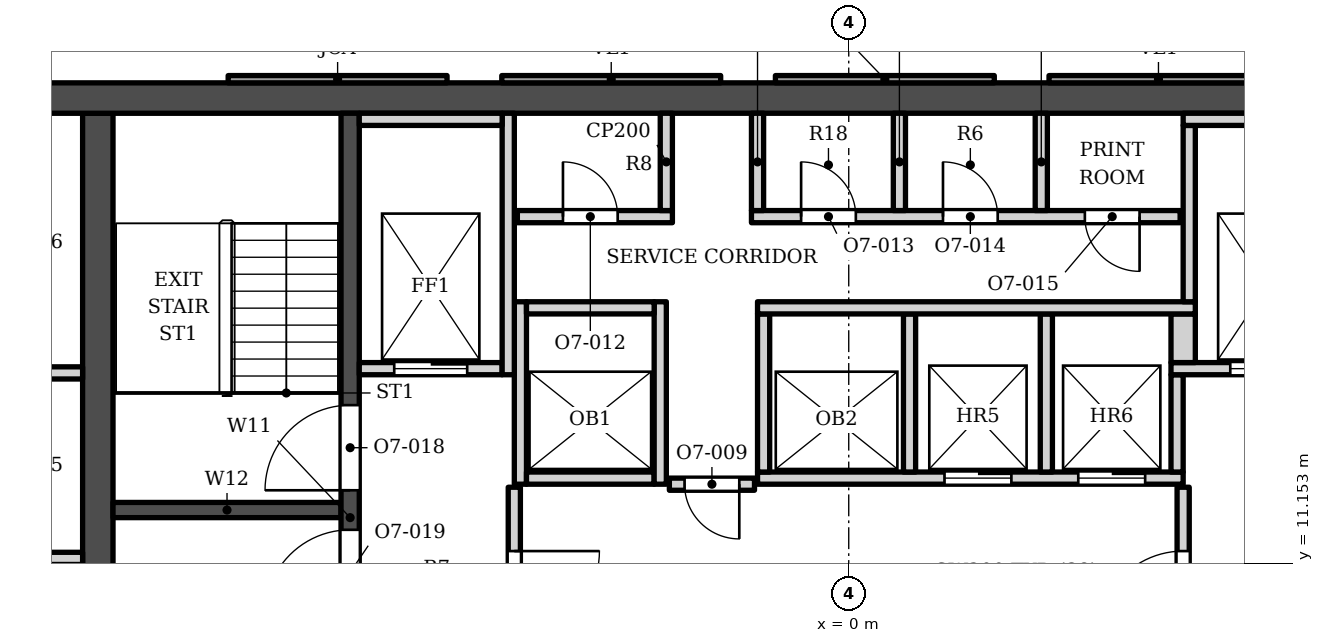
"""IFC4 building model, lengths in metres.
Left out: names, types, materials, properties, quantities, classifications, styles, units other than length and angle.
Written with IfcOpenShell. Run it as: python <this file> out.ifc"""

import sys

from ifc_helpers import new_model, si_unit, direction, frame, frame_2d, origin, place, context, subcontext, project, spatial, polyline, rectangle, outline, extrude, element, fill, save


model = new_model("IFC4")
c1 = context("Model", 3, precision=1e-05, world=origin(), true_north=direction((0.0, 1.0)))
c2 = subcontext(c1, "Body", "Model", "MODEL_VIEW")
j1 = project(units=[si_unit("LENGTHUNIT", "METRE"), si_unit("PLANEANGLEUNIT", "RADIAN")], contexts=[c1])
p1 = place(None, origin())
s1 = spatial("IfcSite", under=j1, at=p1, CompositionType="ELEMENT")
p2 = place(p1, origin())
s2 = spatial("IfcBuilding", under=s1, at=p2, CompositionType="ELEMENT")
p3 = place(p2, frame((0.0, 0.0, 219.8)))
s3 = spatial("IfcBuildingStorey", under=s2, at=p3, CompositionType="ELEMENT", Elevation=219.8)
p4 = place(p3, frame((-13.9, 18.802, 0.0), z_axis=(0.0, 0.0, 1.0), x_axis=(1.0, 0.0, 0.0)))
e1 = element("IfcWall", 1, at=p4, inside=s3, PredefinedType="SHEAR", context=c2, shape_type="SweptSolid", body=[
    extrude(rectangle(XDim=27.8, YDim=0.5, at=frame_2d((13.9, 0.0))), origin(), (0.0, 0.0, 1.0), 3.9),
])
p5 = place(p3, frame((-12.35, 5.253, 0.0), z_axis=(0.0, 0.0, 1.0), x_axis=(0.0, 1.0, 0.0)))
e2 = element("IfcWall", 2, at=p5, inside=s3, PredefinedType="SHEAR", context=c2, shape_type="SweptSolid", body=[
    extrude(rectangle(XDim=13.3, YDim=0.5, at=frame_2d((6.65, 0.0))), origin(), (0.0, 0.0, 1.0), 3.9),
])
p6 = place(p3, frame((-8.2, 5.253, 0.0), z_axis=(0.0, 0.0, 1.0), x_axis=(0.0, 1.0, 0.0)))
e3 = element("IfcWall", 3, at=p6, inside=s3, PredefinedType="SHEAR", context=c2, shape_type="SweptSolid", body=[
    extrude(rectangle(XDim=13.3, YDim=0.3, at=frame_2d((6.65, 0.0))), origin(), (0.0, 0.0, 1.0), 3.9),
])
p7 = place(p6, frame((7.1, 0.0, 0.0)))
e4 = element("IfcOpeningElement", 4, at=p7, cuts=e3, PredefinedType="OPENING", context=c2, shape_type="SweptSolid", body=[
    extrude(rectangle(XDim=1.4, YDim=2.1, at=frame_2d((0.7, 1.05))), frame((0.0, 0.16, 0.0), z_axis=(0.0, -1.0, 0.0), x_axis=(1.0, 0.0, 0.0)), (0.0, 0.0, 1.0), 0.32),
])
p8 = place(p6, frame((5.05, 0.0, 0.0)))
e5 = element("IfcOpeningElement", 5, at=p8, cuts=e3, PredefinedType="OPENING", context=c2, shape_type="SweptSolid", body=[
    extrude(rectangle(XDim=1.4, YDim=2.1, at=frame_2d((0.7, 1.05))), frame((0.0, 0.16, 0.0), z_axis=(0.0, -1.0, 0.0), x_axis=(1.0, 0.0, 0.0)), (0.0, 0.0, 1.0), 0.32),
])
p9 = place(p3, frame((-12.1, 12.028, 0.0), z_axis=(0.0, 0.0, 1.0), x_axis=(1.0, 0.0, 0.0)))
e6 = element("IfcWall", 6, at=p9, inside=s3, PredefinedType="SHEAR", context=c2, shape_type="SweptSolid", body=[
    extrude(rectangle(XDim=3.75, YDim=0.25, at=frame_2d((1.875, 0.0))), origin(), (0.0, 0.0, 1.0), 3.9),
])
p10 = place(p3, origin())
e7 = element("IfcWall", 7, at=p10, inside=s3, PredefinedType="ELEMENTEDWALL", context=c2, shape_type="SweptSolid", body=[
    extrude(outline(polyline([(3.294, 19.173), (3.294, 19.052), (6.894, 19.052), (6.894, 19.173), (3.294, 19.173)])), origin(), (0.0, 0.0, 1.0), 3.0),
])
p11 = place(p3, origin())
e8 = element("IfcWall", 8, at=p11, inside=s3, PredefinedType="SOLIDWALL", context=c2, shape_type="SweptSolid", body=[
    extrude(outline(polyline([(-1.206, 19.173), (-1.206, 19.052), (2.394, 19.052), (2.394, 19.173), (-1.206, 19.173)])), origin(), (0.0, 0.0, 1.0), 3.0),
])
p12 = place(p3, origin())
e9 = element("IfcWall", 9, at=p12, inside=s3, PredefinedType="ELEMENTEDWALL", context=c2, shape_type="SweptSolid", body=[
    extrude(outline(polyline([(-5.706, 19.173), (-5.706, 19.052), (-2.106, 19.052), (-2.106, 19.173), (-5.706, 19.173)])), origin(), (0.0, 0.0, 1.0), 3.0),
])
p13 = place(p3, origin())
e10 = element("IfcWall", 10, at=p13, inside=s3, PredefinedType="SOLIDWALL", context=c2, shape_type="SweptSolid", body=[
    extrude(outline(polyline([(-10.206, 19.173), (-10.206, 19.052), (-6.606, 19.052), (-6.606, 19.173), (-10.206, 19.173)])), origin(), (0.0, 0.0, 1.0), 3.0),
])
p14 = place(p3, frame((-5.5, 9.103, 0.0), z_axis=(0.0, 0.0, 1.0), x_axis=(0.0, 1.0, 0.0)))
e11 = element("IfcWall", 11, at=p14, inside=s3, PredefinedType="SOLIDWALL", context=c2, shape_type="SweptSolid", body=[
    extrude(rectangle(XDim=3.3, YDim=0.2, at=frame_2d((1.65, 0.0))), origin(), (0.0, 0.0, 1.0), 3.73),
])
p15 = place(p14, frame((0.85, 0.0, 0.0)))
e12 = element("IfcOpeningElement", 12, at=p15, cuts=e11, PredefinedType="OPENING", context=c2, shape_type="SweptSolid", body=[
    extrude(rectangle(XDim=1.4, YDim=2.1, at=frame_2d((0.7, 1.05))), frame((0.0, 0.11, 0.0), z_axis=(0.0, -1.0, 0.0), x_axis=(1.0, 0.0, 0.0)), (0.0, 0.0, 1.0), 0.22),
])
p16 = place(p3, frame((5.5, 9.103, 0.0), z_axis=(0.0, 0.0, 1.0), x_axis=(0.0, 1.0, 0.0)))
e13 = element("IfcWall", 13, at=p16, inside=s3, PredefinedType="SOLIDWALL", context=c2, shape_type="SweptSolid", body=[
    extrude(rectangle(XDim=3.3, YDim=0.2, at=frame_2d((1.65, 0.0))), origin(), (0.0, 0.0, 1.0), 3.73),
])
p17 = place(p16, frame((0.85, 0.0, 0.0)))
e14 = element("IfcOpeningElement", 14, at=p17, cuts=e13, PredefinedType="OPENING", context=c2, shape_type="SweptSolid", body=[
    extrude(rectangle(XDim=1.4, YDim=2.1, at=frame_2d((0.7, 1.05))), frame((0.0, 0.11, 0.0), z_axis=(0.0, -1.0, 0.0), x_axis=(1.0, 0.0, 0.0)), (0.0, 0.0, 1.0), 0.22),
])
p18 = place(p3, frame((-13.9, 11.233, 0.0), z_axis=(0.0, 0.0, 1.0), x_axis=(1.0, 0.0, 0.0)))
e15 = element("IfcWall", 15, at=p18, inside=s3, PredefinedType="SOLIDWALL", context=c2, shape_type="SweptSolid", body=[
    extrude(rectangle(XDim=1.3, YDim=0.2, at=frame_2d((0.65, 0.0))), origin(), (0.0, 0.0, 1.0), 3.73),
])
p19 = place(p3, frame((-2.95, 12.453, 0.0), z_axis=(0.0, 0.0, 1.0), x_axis=(1.0, 0.0, 0.0)))
e16 = element("IfcWall", 16, at=p19, inside=s3, PredefinedType="SOLIDWALL", context=c2, shape_type="SweptSolid", body=[
    extrude(rectangle(XDim=1.4, YDim=0.2, at=frame_2d((0.7, 0.0))), origin(), (0.0, 0.0, 1.0), 3.73),
])
p20 = place(p19, frame((0.25, 0.0, 0.0)))
e17 = element("IfcOpeningElement", 17, at=p20, cuts=e16, PredefinedType="OPENING", context=c2, shape_type="SweptSolid", body=[
    extrude(rectangle(XDim=0.9, YDim=2.1, at=frame_2d((0.45, 1.05))), frame((0.0, 0.11, 0.0), z_axis=(0.0, -1.0, 0.0), x_axis=(1.0, 0.0, 0.0)), (0.0, 0.0, 1.0), 0.22),
])
p21 = place(p3, frame((-5.4, 12.453, 0.0), z_axis=(0.0, 0.0, 1.0), x_axis=(0.0, 1.0, 0.0)))
e18 = element("IfcWall", 18, at=p21, inside=s3, PredefinedType="SOLIDWALL", context=c2, shape_type="SweptSolid", body=[
    extrude(rectangle(XDim=3.0, YDim=0.2, at=frame_2d((1.5, 0.0))), origin(), (0.0, 0.0, 1.0), 3.73),
])
p22 = place(p3, frame((-5.3, 12.552, 0.0), z_axis=(0.0, 0.0, 1.0), x_axis=(1.0, 0.0, 0.0)))
e19 = element("IfcWall", 19, at=p22, inside=s3, PredefinedType="SOLIDWALL", context=c2, shape_type="SweptSolid", body=[
    extrude(rectangle(XDim=2.1, YDim=0.2, at=frame_2d((1.05, 0.0))), origin(), (0.0, 0.0, 1.0), 3.73),
])
p23 = place(p3, frame((-3.1, 12.453, 0.0), z_axis=(0.0, 0.0, 1.0), x_axis=(0.0, 1.0, 0.0)))
e20 = element("IfcWall", 20, at=p23, inside=s3, PredefinedType="SOLIDWALL", context=c2, shape_type="SweptSolid", body=[
    extrude(rectangle(XDim=3.0, YDim=0.2, at=frame_2d((1.5, 0.0))), origin(), (0.0, 0.0, 1.0), 3.73),
])
p24 = place(p3, frame((-1.5, 12.552, 0.0), z_axis=(0.0, 0.0, 1.0), x_axis=(1.0, 0.0, 0.0)))
e21 = element("IfcWall", 21, at=p24, inside=s3, PredefinedType="SOLIDWALL", context=c2, shape_type="SweptSolid", body=[
    extrude(rectangle(XDim=7.0, YDim=0.2, at=frame_2d((3.5, 0.0))), origin(), (0.0, 0.0, 1.0), 3.73),
])
p25 = place(p24, frame((3.075, 0.0, 0.0)))
e22 = element("IfcOpeningElement", 22, at=p25, cuts=e21, PredefinedType="OPENING", context=c2, shape_type="SweptSolid", body=[
    extrude(rectangle(XDim=1.1, YDim=2.1, at=frame_2d((0.55, 1.05))), frame((0.0, 0.11, 0.0), z_axis=(0.0, -1.0, 0.0), x_axis=(1.0, 0.0, 0.0)), (0.0, 0.0, 1.0), 0.22),
])
p26 = place(p24, frame((5.275, 0.0, 0.0)))
e23 = element("IfcOpeningElement", 23, at=p26, cuts=e21, PredefinedType="OPENING", context=c2, shape_type="SweptSolid", body=[
    extrude(rectangle(XDim=1.1, YDim=2.1, at=frame_2d((0.55, 1.05))), frame((0.0, 0.11, 0.0), z_axis=(0.0, -1.0, 0.0), x_axis=(1.0, 0.0, 0.0)), (0.0, 0.0, 1.0), 0.22),
])
for number, where, z_axis, x_axis in (
    (24, (-1.4, 12.653, 0.0), (0.0, 0.0, 1.0), (0.0, 1.0, 0.0)),
    (25, (1.0, 12.653, 0.0), (0.0, 0.0, 1.0), (0.0, 1.0, 0.0)),
    (26, (3.25, 12.653, 0.0), (0.0, 0.0, 1.0), (0.0, 1.0, 0.0)),
):
    element("IfcWall", number, at=place(p3, frame(where, z_axis=z_axis, x_axis=x_axis)), inside=s3, PredefinedType="SOLIDWALL", context=c2, shape_type="SweptSolid", body=[
        extrude(rectangle(XDim=2.6, YDim=0.2, at=frame_2d((1.3, 0.0))), origin(), (0.0, 0.0, 1.0), 3.73),
    ])
p27 = place(p3, frame((5.4, 12.653, 0.0), z_axis=(0.0, 0.0, 1.0), x_axis=(0.0, 1.0, 0.0)))
e27 = element("IfcWall", 27, at=p27, inside=s3, PredefinedType="SOLIDWALL", context=c2, shape_type="SweptSolid", body=[
    extrude(rectangle(XDim=1.6, YDim=0.2, at=frame_2d((0.8, 0.0))), origin(), (0.0, 0.0, 1.0), 3.73),
])
p28 = place(p3, frame((-13.9, 14.283, 0.0), z_axis=(0.0, 0.0, 1.0), x_axis=(1.0, 0.0, 0.0)))
e28 = element("IfcWall", 28, at=p28, inside=s3, PredefinedType="SOLIDWALL", context=c2, shape_type="SweptSolid", body=[
    extrude(rectangle(XDim=1.3, YDim=0.2, at=frame_2d((0.65, 0.0))), origin(), (0.0, 0.0, 1.0), 3.73),
])
p29 = place(p3, frame((-8.05, 14.353, 0.0), z_axis=(0.0, 0.0, 1.0), x_axis=(1.0, 0.0, 0.0)))
e29 = element("IfcWall", 29, at=p29, inside=s3, PredefinedType="SOLIDWALL", context=c2, shape_type="SweptSolid", body=[
    extrude(rectangle(XDim=2.35, YDim=0.2, at=frame_2d((1.175, 0.0))), origin(), (0.0, 0.0, 1.0), 3.73),
])
p30 = place(p29, frame((0.575, 0.0, 0.0)))
e30 = element("IfcOpeningElement", 30, at=p30, cuts=e29, PredefinedType="OPENING", context=c2, shape_type="SweptSolid", body=[
    extrude(rectangle(XDim=1.2, YDim=2.1, at=frame_2d((0.6, 1.05))), frame((0.0, 0.11, 0.0), z_axis=(0.0, -1.0, 0.0), x_axis=(1.0, 0.0, 0.0)), (0.0, 0.0, 1.0), 0.22),
])
p31 = place(p3, frame((-5.6, 14.253, 0.0), z_axis=(0.0, 0.0, 1.0), x_axis=(0.0, 1.0, 0.0)))
e31 = element("IfcWall", 31, at=p31, inside=s3, PredefinedType="SOLIDWALL", context=c2, shape_type="SweptSolid", body=[
    extrude(rectangle(XDim=4.3, YDim=0.2, at=frame_2d((2.15, 0.0))), origin(), (0.0, 0.0, 1.0), 3.73),
])
p32 = place(p3, frame((5.3, 14.353, 0.0), z_axis=(0.0, 0.0, 1.0), x_axis=(1.0, 0.0, 0.0)))
e32 = element("IfcWall", 32, at=p32, inside=s3, PredefinedType="SOLIDWALL", context=c2, shape_type="SweptSolid", body=[
    extrude(rectangle(XDim=2.75, YDim=0.2, at=frame_2d((1.375, 0.0))), origin(), (0.0, 0.0, 1.0), 3.73),
])
p33 = place(p32, frame((0.975, 0.0, 0.0)))
e33 = element("IfcOpeningElement", 33, at=p33, cuts=e32, PredefinedType="OPENING", context=c2, shape_type="SweptSolid", body=[
    extrude(rectangle(XDim=1.2, YDim=2.1, at=frame_2d((0.6, 1.05))), frame((0.0, 0.11, 0.0), z_axis=(0.0, -1.0, 0.0), x_axis=(1.0, 0.0, 0.0)), (0.0, 0.0, 1.0), 0.22),
])
p34 = place(p3, frame((5.5, 14.453, 0.0), z_axis=(0.0, 0.0, 1.0), x_axis=(0.0, 1.0, 0.0)))
e34 = element("IfcWall", 34, at=p34, inside=s3, PredefinedType="SOLIDWALL", context=c2, shape_type="SweptSolid", body=[
    extrude(rectangle(XDim=0.8, YDim=0.4, at=frame_2d((0.4, 0.0))), origin(), (0.0, 0.0, 1.0), 3.73),
])
p35 = place(p3, frame((-5.3, 15.353, 0.0), z_axis=(0.0, 0.0, 1.0), x_axis=(1.0, 0.0, 0.0)))
e35 = element("IfcWall", 35, at=p35, inside=s3, PredefinedType="SOLIDWALL", context=c2, shape_type="SweptSolid", body=[
    extrude(rectangle(XDim=2.1, YDim=0.2, at=frame_2d((1.05, 0.0))), origin(), (0.0, 0.0, 1.0), 3.73),
])
p36 = place(p3, frame((-1.5, 15.353, 0.0), z_axis=(0.0, 0.0, 1.0), x_axis=(1.0, 0.0, 0.0)))
e36 = element("IfcWall", 36, at=p36, inside=s3, PredefinedType="SOLIDWALL", context=c2, shape_type="SweptSolid", body=[
    extrude(rectangle(XDim=7.2, YDim=0.2, at=frame_2d((3.6, 0.0))), origin(), (0.0, 0.0, 1.0), 3.73),
])
p37 = place(p3, frame((5.6, 15.453, 0.0), z_axis=(0.0, 0.0, 1.0), x_axis=(0.0, 1.0, 0.0)))
e37 = element("IfcWall", 37, at=p37, inside=s3, PredefinedType="SOLIDWALL", context=c2, shape_type="SweptSolid", body=[
    extrude(rectangle(XDim=2.9, YDim=0.2, at=frame_2d((1.45, 0.0))), origin(), (0.0, 0.0, 1.0), 3.73),
])
p38 = place(p3, frame((-5.45, 16.853, 0.0), z_axis=(0.0, 0.0, 1.0), x_axis=(1.0, 0.0, 0.0)))
e38 = element("IfcWall", 38, at=p38, inside=s3, PredefinedType="SOLIDWALL", context=c2, shape_type="SweptSolid", body=[
    extrude(rectangle(XDim=2.55, YDim=0.2, at=frame_2d((1.275, 0.0))), origin(), (0.0, 0.0, 1.0), 3.73),
])
p39 = place(p38, frame((0.75, 0.0, 0.0)))
e39 = element("IfcOpeningElement", 39, at=p39, cuts=e38, PredefinedType="OPENING", context=c2, shape_type="SweptSolid", body=[
    extrude(rectangle(XDim=0.9, YDim=2.1, at=frame_2d((0.45, 1.05))), frame((0.0, 0.11, 0.0), z_axis=(0.0, -1.0, 0.0), x_axis=(1.0, 0.0, 0.0)), (0.0, 0.0, 1.0), 0.22),
])
p40 = place(p3, frame((-1.6, 16.853, 0.0), z_axis=(0.0, 0.0, 1.0), x_axis=(1.0, 0.0, 0.0)))
e40 = element("IfcWall", 40, at=p40, inside=s3, PredefinedType="SOLIDWALL", context=c2, shape_type="SweptSolid", body=[
    extrude(rectangle(XDim=7.05, YDim=0.2, at=frame_2d((3.525, 0.0))), origin(), (0.0, 0.0, 1.0), 3.73),
])
p41 = place(p40, frame((0.817, 0.0, 0.0)))
e41 = element("IfcOpeningElement", 41, at=p41, cuts=e40, PredefinedType="OPENING", context=c2, shape_type="SweptSolid", body=[
    extrude(rectangle(XDim=0.9, YDim=2.1, at=frame_2d((0.45, 1.05))), frame((0.0, 0.11, 0.0), z_axis=(0.0, -1.0, 0.0), x_axis=(1.0, 0.0, 0.0)), (0.0, 0.0, 1.0), 0.22),
])
p42 = place(p40, frame((3.15, 0.0, 0.0)))
e42 = element("IfcOpeningElement", 42, at=p42, cuts=e40, PredefinedType="OPENING", context=c2, shape_type="SweptSolid", body=[
    extrude(rectangle(XDim=0.9, YDim=2.1, at=frame_2d((0.45, 1.05))), frame((0.0, 0.11, 0.0), z_axis=(0.0, -1.0, 0.0), x_axis=(1.0, 0.0, 0.0)), (0.0, 0.0, 1.0), 0.22),
])
p43 = place(p40, frame((5.483, 0.0, 0.0)))
e43 = element("IfcOpeningElement", 43, at=p43, cuts=e40, PredefinedType="OPENING", context=c2, shape_type="SweptSolid", body=[
    extrude(rectangle(XDim=0.9, YDim=2.1, at=frame_2d((0.45, 1.05))), frame((0.0, 0.11, 0.0), z_axis=(0.0, -1.0, 0.0), x_axis=(1.0, 0.0, 0.0)), (0.0, 0.0, 1.0), 0.22),
])
for number, where, z_axis, x_axis in (
    (44, (-3.0, 16.953, 0.0), (0.0, 0.0, 1.0), (0.0, 1.0, 0.0)),
    (45, (-1.5, 16.953, 0.0), (0.0, 0.0, 1.0), (0.0, 1.0, 0.0)),
    (46, (0.833, 16.953, 0.0), (0.0, 0.0, 1.0), (0.0, 1.0, 0.0)),
    (47, (3.167, 16.953, 0.0), (0.0, 0.0, 1.0), (0.0, 1.0, 0.0)),
):
    element("IfcWall", number, at=place(p3, frame(where, z_axis=z_axis, x_axis=x_axis)), inside=s3, PredefinedType="PARTITIONING", context=c2, shape_type="SweptSolid", body=[
        extrude(rectangle(XDim=1.6, YDim=0.2, at=frame_2d((0.8, 0.0))), origin(), (0.0, 0.0, 1.0), 3.73),
    ])
p44 = place(p3, frame((-8.05, 18.453, 0.0), z_axis=(0.0, 0.0, 1.0), x_axis=(1.0, 0.0, 0.0)))
e48 = element("IfcWall", 48, at=p44, inside=s3, PredefinedType="SOLIDWALL", context=c2, shape_type="SweptSolid", body=[
    extrude(rectangle(XDim=2.35, YDim=0.2, at=frame_2d((1.175, 0.0))), origin(), (0.0, 0.0, 1.0), 3.73),
])
p45 = place(p3, frame((5.5, 18.453, 0.0), z_axis=(0.0, 0.0, 1.0), x_axis=(1.0, 0.0, 0.0)))
e49 = element("IfcWall", 49, at=p45, inside=s3, PredefinedType="SOLIDWALL", context=c2, shape_type="SweptSolid", body=[
    extrude(rectangle(XDim=2.55, YDim=0.2, at=frame_2d((1.275, 0.0))), origin(), (0.0, 0.0, 1.0), 3.73),
])
p46 = place(p25, origin())
e50 = element("IfcDoor", 50, at=p46, inside=s3, OperationType="DOUBLE_DOOR_SLIDING", PredefinedType="DOOR", context=c2, shape_type="SweptSolid", body=[
    extrude(rectangle(XDim=1.1, YDim=2.1, at=frame_2d((0.55, 1.05))), frame((0.0, 0.025, 0.0), z_axis=(0.0, -1.0, 0.0), x_axis=(1.0, 0.0, 0.0)), (0.0, 0.0, 1.0), 0.05),
])
fill(e22, e50)
p47 = place(p26, origin())
e51 = element("IfcDoor", 51, at=p47, inside=s3, OperationType="DOUBLE_DOOR_SLIDING", PredefinedType="DOOR", context=c2, shape_type="SweptSolid", body=[
    extrude(rectangle(XDim=1.1, YDim=2.1, at=frame_2d((0.55, 1.05))), frame((0.0, 0.025, 0.0), z_axis=(0.0, -1.0, 0.0), x_axis=(1.0, 0.0, 0.0)), (0.0, 0.0, 1.0), 0.05),
])
fill(e23, e51)
p48 = place(p30, origin())
e52 = element("IfcDoor", 52, at=p48, inside=s3, OperationType="DOUBLE_DOOR_SLIDING", PredefinedType="DOOR", context=c2, shape_type="SweptSolid", body=[
    extrude(rectangle(XDim=1.2, YDim=2.1, at=frame_2d((0.6, 1.05))), frame((0.0, 0.025, 0.0), z_axis=(0.0, -1.0, 0.0), x_axis=(1.0, 0.0, 0.0)), (0.0, 0.0, 1.0), 0.05),
])
fill(e30, e52)
p49 = place(p33, origin())
e53 = element("IfcDoor", 53, at=p49, inside=s3, OperationType="DOUBLE_DOOR_SLIDING", PredefinedType="DOOR", context=c2, shape_type="SweptSolid", body=[
    extrude(rectangle(XDim=1.2, YDim=2.1, at=frame_2d((0.6, 1.05))), frame((0.0, 0.025, 0.0), z_axis=(0.0, -1.0, 0.0), x_axis=(1.0, 0.0, 0.0)), (0.0, 0.0, 1.0), 0.05),
])
fill(e33, e53)
p50 = place(p7, origin())
e54 = element("IfcDoor", 54, at=p50, inside=s3, OperationType="SINGLE_SWING_LEFT", PredefinedType="DOOR", context=c2, shape_type="SweptSolid", body=[
    extrude(rectangle(XDim=1.4, YDim=2.1, at=frame_2d((0.7, 1.05))), frame((0.0, 0.025, 0.0), z_axis=(0.0, -1.0, 0.0), x_axis=(1.0, 0.0, 0.0)), (0.0, 0.0, 1.0), 0.05),
])
fill(e4, e54)
p51 = place(p8, origin())
e55 = element("IfcDoor", 55, at=p51, inside=s3, OperationType="SINGLE_SWING_LEFT", PredefinedType="DOOR", context=c2, shape_type="SweptSolid", body=[
    extrude(rectangle(XDim=1.4, YDim=2.1, at=frame_2d((0.7, 1.05))), frame((0.0, 0.025, 0.0), z_axis=(0.0, -1.0, 0.0), x_axis=(1.0, 0.0, 0.0)), (0.0, 0.0, 1.0), 0.05),
])
fill(e5, e55)
p52 = place(p20, origin())
e56 = element("IfcDoor", 56, at=p52, inside=s3, OperationType="SINGLE_SWING_RIGHT", PredefinedType="DOOR", context=c2, shape_type="SweptSolid", body=[
    extrude(rectangle(XDim=0.9, YDim=2.1, at=frame_2d((0.45, 1.05))), frame((0.0, 0.025, 0.0), z_axis=(0.0, -1.0, 0.0), x_axis=(1.0, 0.0, 0.0)), (0.0, 0.0, 1.0), 0.05),
])
fill(e17, e56)
p53 = place(p15, origin())
e57 = element("IfcDoor", 57, at=p53, inside=s3, OperationType="SINGLE_SWING_RIGHT", PredefinedType="DOOR", context=c2, shape_type="SweptSolid", body=[
    extrude(rectangle(XDim=1.4, YDim=2.1, at=frame_2d((0.7, 1.05))), frame((0.0, 0.025, 0.0), z_axis=(0.0, -1.0, 0.0), x_axis=(1.0, 0.0, 0.0)), (0.0, 0.0, 1.0), 0.05),
])
fill(e12, e57)
p54 = place(p17, origin())
e58 = element("IfcDoor", 58, at=p54, inside=s3, OperationType="SINGLE_SWING_LEFT", PredefinedType="DOOR", context=c2, shape_type="SweptSolid", body=[
    extrude(rectangle(XDim=1.4, YDim=2.1, at=frame_2d((0.7, 1.05))), frame((0.0, 0.025, 0.0), z_axis=(0.0, -1.0, 0.0), x_axis=(1.0, 0.0, 0.0)), (0.0, 0.0, 1.0), 0.05),
])
fill(e14, e58)
p55 = place(p39, origin())
e59 = element("IfcDoor", 59, at=p55, inside=s3, OperationType="SINGLE_SWING_LEFT", PredefinedType="DOOR", context=c2, shape_type="SweptSolid", body=[
    extrude(rectangle(XDim=0.9, YDim=2.1, at=frame_2d((0.45, 1.05))), frame((0.0, 0.025, 0.0), z_axis=(0.0, -1.0, 0.0), x_axis=(1.0, 0.0, 0.0)), (0.0, 0.0, 1.0), 0.05),
])
fill(e39, e59)
p56 = place(p41, origin())
e60 = element("IfcDoor", 60, at=p56, inside=s3, OperationType="SINGLE_SWING_LEFT", PredefinedType="DOOR", context=c2, shape_type="SweptSolid", body=[
    extrude(rectangle(XDim=0.9, YDim=2.1, at=frame_2d((0.45, 1.05))), frame((0.0, 0.025, 0.0), z_axis=(0.0, -1.0, 0.0), x_axis=(1.0, 0.0, 0.0)), (0.0, 0.0, 1.0), 0.05),
])
fill(e41, e60)
p57 = place(p42, origin())
e61 = element("IfcDoor", 61, at=p57, inside=s3, OperationType="SINGLE_SWING_LEFT", PredefinedType="DOOR", context=c2, shape_type="SweptSolid", body=[
    extrude(rectangle(XDim=0.9, YDim=2.1, at=frame_2d((0.45, 1.05))), frame((0.0, 0.025, 0.0), z_axis=(0.0, -1.0, 0.0), x_axis=(1.0, 0.0, 0.0)), (0.0, 0.0, 1.0), 0.05),
])
fill(e42, e61)
p58 = place(p43, origin())
e62 = element("IfcDoor", 62, at=p58, inside=s3, OperationType="SINGLE_SWING_RIGHT", PredefinedType="DOOR", context=c2, shape_type="SweptSolid", body=[
    extrude(rectangle(XDim=0.9, YDim=2.1, at=frame_2d((0.45, 1.05))), frame((0.0, 0.025, 0.0), z_axis=(0.0, -1.0, 0.0), x_axis=(1.0, 0.0, 0.0)), (0.0, 0.0, 1.0), 0.05),
])
fill(e43, e62)
save(model, sys.argv[1])
